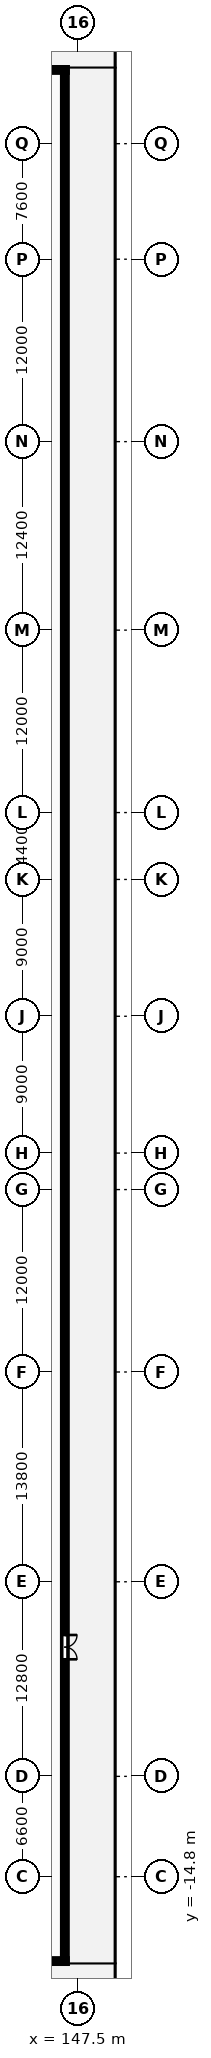
"""IFC4 building model, lengths in metres.
Left out: names, types, materials, properties, quantities, classifications, styles, units other than length and angle.
Written with IfcOpenShell. Run it as: python <this file> out.ifc"""

import sys

from ifc_helpers import new_model, si_unit, direction, frame, frame_2d, origin, place, context, subcontext, project, spatial, rectangle, extrude, element, fill, save


model = new_model("IFC4")
c1 = context("Model", 3, precision=1e-05, world=origin(), true_north=direction((0.0, 1.0)))
c2 = subcontext(c1, "Body", "Model", "MODEL_VIEW")
j1 = project(units=[si_unit("LENGTHUNIT", "METRE"), si_unit("PLANEANGLEUNIT", "RADIAN")], contexts=[c1])
p1 = place(None, origin())
s1 = spatial("IfcSite", under=j1, at=p1, CompositionType="ELEMENT")
p2 = place(p1, origin())
s2 = spatial("IfcBuilding", under=s1, at=p2, CompositionType="ELEMENT")
p3 = place(p2, frame((0.0, 0.0, 10.0)))
s3 = spatial("IfcBuildingStorey", under=s2, at=p3, CompositionType="ELEMENT", Elevation=10.0)
p4 = place(p3, frame((110.0, -20.35, 0.0), z_axis=(0.0, 0.0, 1.0), x_axis=(1.0, 0.0, 0.0)))
e1 = element("IfcWall", 1, at=p4, inside=s3, PredefinedType="STANDARD", context=c2, shape_type="SweptSolid", body=[
    extrude(rectangle(XDim=36.8, YDim=0.3, at=frame_2d((18.4, 0.0))), origin(), (0.0, 0.0, 1.0), 4.2),
])
p5 = place(p3, frame((146.8, 104.05, 0.0), z_axis=(0.0, 0.0, 1.0), x_axis=(-1.0, 0.0, 0.0)))
e2 = element("IfcWall", 2, at=p5, inside=s3, PredefinedType="STANDARD", context=c2, shape_type="SweptSolid", body=[
    extrude(rectangle(XDim=38.8, YDim=0.3, at=frame_2d((19.4, 0.0))), origin(), (0.0, 0.0, 1.0), 4.2),
])
p6 = place(p5, frame((10.0, 0.0, 0.0)))
e3 = element("IfcOpeningElement", 3, at=p6, cuts=e2, PredefinedType="OPENING", context=c2, shape_type="SweptSolid", body=[
    extrude(rectangle(XDim=1.6, YDim=2.2, at=frame_2d((0.8, 1.1))), frame((0.0, 0.16, 0.0), z_axis=(0.0, -1.0, 0.0), x_axis=(1.0, 0.0, 0.0)), (0.0, 0.0, 1.0), 0.32),
])
p7 = place(p3, frame((146.65, -20.5, 0.0), z_axis=(0.0, 0.0, 1.0), x_axis=(0.0, 1.0, 0.0)))
e4 = element("IfcWall", 4, at=p7, inside=s3, PredefinedType="STANDARD", context=c2, shape_type="SweptSolid", body=[
    extrude(rectangle(XDim=124.7, YDim=0.3, at=frame_2d((62.35, 0.0))), origin(), (0.0, 0.0, 1.0), 4.2),
])
p8 = place(p7, frame((20.0, 0.0, 0.0)))
e5 = element("IfcOpeningElement", 5, at=p8, cuts=e4, PredefinedType="OPENING", context=c2, shape_type="SweptSolid", body=[
    extrude(rectangle(XDim=1.6, YDim=2.2, at=frame_2d((0.8, 1.1))), frame((0.0, 0.16, 0.0), z_axis=(0.0, -1.0, 0.0), x_axis=(1.0, 0.0, 0.0)), (0.0, 0.0, 1.0), 0.32),
])
p9 = place(p8, frame((1.6, 0.0, 0.0), z_axis=(0.0, 0.0, 1.0), x_axis=(-1.0, 0.0, 0.0)))
e6 = element("IfcDoor", 6, at=p9, inside=s3, OperationType="DOUBLE_DOOR_SINGLE_SWING", PredefinedType="DOOR", context=c2, shape_type="SweptSolid", body=[
    extrude(rectangle(XDim=1.6, YDim=2.2, at=frame_2d((0.8, 1.1))), frame((0.0, 0.025, 0.0), z_axis=(0.0, -1.0, 0.0), x_axis=(1.0, 0.0, 0.0)), (0.0, 0.0, 1.0), 0.05),
])
fill(e5, e6)
save(model, sys.argv[1])
